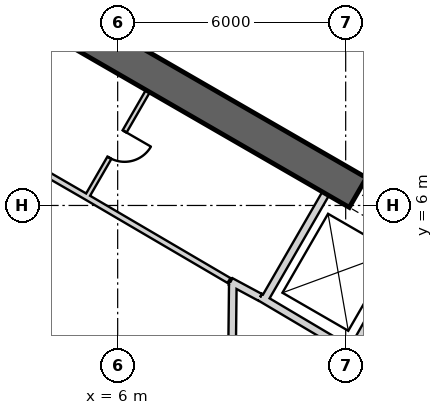
"""IFC4 building model, lengths in metres.
Left out: names, types, materials, properties, quantities, classifications, styles, units other than length and angle.
Written with IfcOpenShell. Run it as: python <this file> out.ifc"""

import sys

from ifc_helpers import new_model, si_unit, direction, frame, frame_2d, origin, place, context, subcontext, project, spatial, rectangle, extrude, element, fill, save


model = new_model("IFC4")
c1 = context("Model", 3, precision=1e-05, world=origin(), true_north=direction((0.0, 1.0)))
c2 = subcontext(c1, "Body", "Model", "MODEL_VIEW")
j1 = project(units=[si_unit("LENGTHUNIT", "METRE"), si_unit("PLANEANGLEUNIT", "RADIAN")], contexts=[c1])
p1 = place(None, origin())
s1 = spatial("IfcSite", under=j1, at=p1, CompositionType="ELEMENT")
p2 = place(p1, origin())
s2 = spatial("IfcBuilding", under=s1, at=p2, CompositionType="ELEMENT")
p3 = place(p2, frame((0.0, 0.0, 253.2)))
s3 = spatial("IfcBuildingStorey", under=s2, at=p3, CompositionType="ELEMENT", Elevation=253.2)
p4 = place(p3, frame((19.475, 2.208, 0.0), z_axis=(0.0, 0.0, 1.0), x_axis=(-0.866028369851, 0.499994862586, 0.0)))
e1 = element("IfcWall", 1, at=p4, inside=s3, PredefinedType="SHEAR", context=c2, shape_type="SweptSolid", body=[
    extrude(rectangle(XDim=31.523, YDim=0.9, at=frame_2d((15.762, 0.0))), origin(), (0.0, 0.0, 1.0), 4.0),
])
p5 = place(p4, frame((7.062, 0.0, 0.0)))
e2 = element("IfcOpeningElement", 2, at=p5, cuts=e1, PredefinedType="OPENING", context=c2, shape_type="SweptSolid", body=[
    extrude(rectangle(XDim=1.2, YDim=2.4, at=frame_2d((0.6, 1.2))), frame((0.0, 0.46, 0.0), z_axis=(0.0, -1.0, 0.0), x_axis=(1.0, 0.0, 0.0)), (0.0, 0.0, 1.0), 0.92),
])
p6 = place(p4, frame((3.612, 0.0, 0.0)))
e3 = element("IfcOpeningElement", 3, at=p6, cuts=e1, PredefinedType="OPENING", context=c2, shape_type="SweptSolid", body=[
    extrude(rectangle(XDim=1.2, YDim=2.4, at=frame_2d((0.6, 1.2))), frame((0.0, 0.46, 0.0), z_axis=(0.0, -1.0, 0.0), x_axis=(1.0, 0.0, 0.0)), (0.0, 0.0, 1.0), 0.92),
])
p7 = place(p4, frame((26.712, 0.0, 0.0)))
e4 = element("IfcOpeningElement", 4, at=p7, cuts=e1, PredefinedType="OPENING", context=c2, shape_type="SweptSolid", body=[
    extrude(rectangle(XDim=1.2, YDim=2.4, at=frame_2d((0.6, 1.2))), frame((0.0, 0.46, 0.0), z_axis=(0.0, -1.0, 0.0), x_axis=(1.0, 0.0, 0.0)), (0.0, 0.0, 1.0), 0.92),
])
p8 = place(p3, frame((9.847, 3.495, 0.0), z_axis=(0.0, 0.0, 1.0), x_axis=(0.499984717929, 0.866034226713, 0.0)))
e5 = element("IfcWall", 5, at=p8, inside=s3, PredefinedType="PLUMBINGWALL", context=c2, shape_type="SweptSolid", body=[
    extrude(rectangle(XDim=3.25, YDim=0.2, at=frame_2d((1.625, 0.0))), origin(), (0.0, 0.0, 1.0), 3.7),
])
p9 = place(p3, frame((12.11, 2.073, 0.0), z_axis=(0.0, 0.0, 1.0), x_axis=(0.49196600604, 0.870614408852, 0.0)))
e6 = element("IfcWall", 6, at=p9, inside=s3, PredefinedType="PLUMBINGWALL", context=c2, shape_type="SweptSolid", body=[
    extrude(rectangle(XDim=3.35, YDim=0.2, at=frame_2d((1.675, 0.0))), origin(), (0.0, 0.0, 1.0), 3.7),
])
p10 = place(p3, frame((12.073, 2.211, 0.0), z_axis=(0.0, 0.0, 1.0), x_axis=(-0.860414880418, 0.509594185166, 0.0)))
e7 = element("IfcWall", 7, at=p10, inside=s3, PredefinedType="PLUMBINGWALL", context=c2, shape_type="SweptSolid", body=[
    extrude(rectangle(XDim=2.7, YDim=0.2, at=frame_2d((1.35, 0.0))), origin(), (0.0, 0.0, 1.0), 3.7),
])
p11 = place(p3, frame((6.795, 9.01, 0.0), z_axis=(0.0, 0.0, 1.0), x_axis=(-0.499984717929, -0.866034226713, 0.0)))
e8 = element("IfcWall", 8, at=p11, inside=s3, PredefinedType="PARTITIONING", context=c2, shape_type="SweptSolid", body=[
    extrude(rectangle(XDim=3.25, YDim=0.12, at=frame_2d((1.625, 0.0))), origin(), (0.0, 0.0, 1.0), 3.7),
])
p12 = place(p11, frame((1.225, 0.0, 0.0)))
e9 = element("IfcOpeningElement", 9, at=p12, cuts=e8, PredefinedType="OPENING", context=c2, shape_type="SweptSolid", body=[
    extrude(rectangle(XDim=0.8, YDim=2.1, at=frame_2d((0.4, 1.05))), frame((0.0, 0.07, 0.0), z_axis=(0.0, -1.0, 0.0), x_axis=(1.0, 0.0, 0.0)), (0.0, 0.0, 1.0), 0.14),
])
p13 = place(p3, frame((8.974, 3.999, 0.0), z_axis=(0.0, 0.0, 1.0), x_axis=(0.880917147855, -0.473270513147, 0.0)))
e10 = element("IfcWall", 10, at=p13, inside=s3, PredefinedType="PARTITIONING", context=c2, shape_type="SweptSolid", body=[
    extrude(rectangle(XDim=0.878, YDim=0.2, at=frame_2d((0.439, 0.0))), origin(), (0.0, 0.0, 1.0), 3.7),
])
p14 = place(p3, frame((8.931, 4.025, 0.0), z_axis=(0.0, 0.0, 1.0), x_axis=(-0.862666884027, 0.505772525157, 0.0)))
e11 = element("IfcWall", 11, at=p14, inside=s3, PredefinedType="PLUMBINGWALL", context=c2, shape_type="SweptSolid", body=[
    extrude(rectangle(XDim=4.372, YDim=0.15, at=frame_2d((2.186, 0.0))), origin(), (0.0, 0.0, 1.0), 3.7),
])
p15 = place(p3, frame((5.159, 6.236, 0.0), z_axis=(0.0, 0.0, 1.0), x_axis=(-0.866028230842, 0.499995103361, 0.0)))
e12 = element("IfcWall", 12, at=p15, inside=s3, PredefinedType="PLUMBINGWALL", context=c2, shape_type="SweptSolid", body=[
    extrude(rectangle(XDim=5.4, YDim=0.15, at=frame_2d((2.7, 0.0))), origin(), (0.0, 0.0, 1.0), 3.7),
])
p16 = place(p15, frame((2.3, 0.0, 0.0)))
e13 = element("IfcOpeningElement", 13, at=p16, cuts=e12, PredefinedType="OPENING", context=c2, shape_type="SweptSolid", body=[
    extrude(rectangle(XDim=0.8, YDim=2.1, at=frame_2d((0.4, 1.05))), frame((0.0, 0.085, 0.0), z_axis=(0.0, -1.0, 0.0), x_axis=(1.0, 0.0, 0.0)), (0.0, 0.0, 1.0), 0.17),
])
p17 = place(p3, frame((9.001, 1.27, 0.0), z_axis=(0.0, 0.0, 1.0), x_axis=(0.01074821465, 0.999942236273, 0.0)))
e14 = element("IfcWall", 14, at=p17, inside=s3, PredefinedType="PARTITIONING", context=c2, shape_type="SweptSolid", body=[
    extrude(rectangle(XDim=2.726, YDim=0.2, at=frame_2d((1.363, 0.0))), origin(), (0.0, 0.0, 1.0), 3.7),
])
p18 = place(p3, frame((16.823, 8.878, 0.0), z_axis=(0.0, 0.0, 1.0), x_axis=(-0.866020355572, 0.500008743658, 0.0)))
e15 = element("IfcWall", 15, at=p18, inside=s3, PredefinedType="PARTITIONING", context=c2, shape_type="SweptSolid", body=[
    extrude(rectangle(XDim=12.18, YDim=0.2, at=frame_2d((6.09, 0.0))), origin(), (0.0, 0.0, 1.0), 2.98),
])
p19 = place(p12, origin())
e16 = element("IfcDoor", 16, at=p19, inside=s3, OperationType="SINGLE_SWING_LEFT", PredefinedType="USERDEFINED", context=c2, shape_type="SweptSolid", body=[
    extrude(rectangle(XDim=0.8, YDim=2.1, at=frame_2d((0.4, 1.05))), frame((0.0, 0.025, 0.0), z_axis=(0.0, -1.0, 0.0), x_axis=(1.0, 0.0, 0.0)), (0.0, 0.0, 1.0), 0.05),
])
fill(e9, e16)
p20 = place(p5, origin())
e17 = element("IfcDoor", 17, at=p20, inside=s3, OperationType="SLIDING_TO_LEFT", PredefinedType="USERDEFINED", context=c2, shape_type="SweptSolid", body=[
    extrude(rectangle(XDim=1.2, YDim=2.4, at=frame_2d((0.6, 1.2))), frame((0.0, 0.025, 0.0), z_axis=(0.0, -1.0, 0.0), x_axis=(1.0, 0.0, 0.0)), (0.0, 0.0, 1.0), 0.05),
])
fill(e2, e17)
save(model, sys.argv[1])
